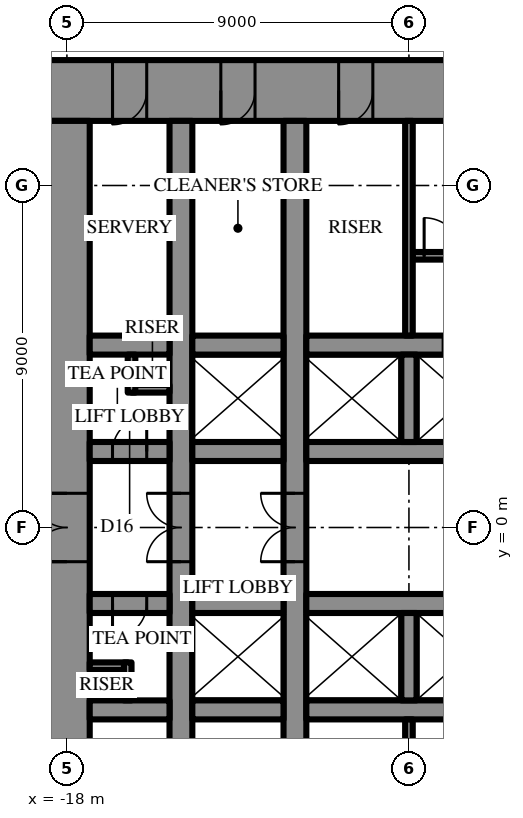
"""IFC4 building model, lengths in metres.
Left out: names, types, materials, properties, quantities, classifications, styles, units other than length and angle.
Written with IfcOpenShell. Run it as: python <this file> out.ifc"""

import sys

from ifc_helpers import new_model, si_unit, direction, frame, frame_2d, origin, place, context, subcontext, project, spatial, rectangle, extrude, element, fill, save


model = new_model("IFC4")
c1 = context("Model", 3, precision=1e-05, world=origin(), true_north=direction((0.0, 1.0)))
c2 = subcontext(c1, "Body", "Model", "MODEL_VIEW")
j1 = project(units=[si_unit("LENGTHUNIT", "METRE"), si_unit("PLANEANGLEUNIT", "RADIAN")], contexts=[c1])
p1 = place(None, origin())
s1 = spatial("IfcSite", under=j1, at=p1, CompositionType="ELEMENT")
p2 = place(p1, origin())
s2 = spatial("IfcBuilding", under=s1, at=p2, CompositionType="ELEMENT")
p3 = place(p2, frame((0.0, 0.0, 161.5)))
s3 = spatial("IfcBuildingStorey", under=s2, at=p3, CompositionType="ELEMENT", Elevation=161.5)
p4 = place(p3, frame((-18.6, 11.5, 0.0), z_axis=(0.0, 0.0, 1.0), x_axis=(1.0, 0.0, 0.0)))
e1 = element("IfcWall", 1, at=p4, inside=s3, PredefinedType="SHEAR", context=c2, shape_type="SweptSolid", body=[
    extrude(rectangle(XDim=37.2, YDim=1.6, at=frame_2d((18.6, 0.0))), origin(), (0.0, 0.0, 1.0), 4.2),
])
p5 = place(p4, frame((19.45, 0.0, 0.0)))
e2 = element("IfcOpeningElement", 2, at=p5, cuts=e1, PredefinedType="OPENING", context=c2, shape_type="SweptSolid", body=[
    extrude(rectangle(XDim=0.9, YDim=2.2, at=frame_2d((0.45, 1.1))), frame((0.0, 0.81, 0.0), z_axis=(0.0, -1.0, 0.0), x_axis=(1.0, 0.0, 0.0)), (0.0, 0.0, 1.0), 1.62),
])
p6 = place(p4, frame((22.45, 0.0, 0.0)))
e3 = element("IfcOpeningElement", 3, at=p6, cuts=e1, PredefinedType="OPENING", context=c2, shape_type="SweptSolid", body=[
    extrude(rectangle(XDim=0.9, YDim=2.2, at=frame_2d((0.45, 1.1))), frame((0.0, 0.81, 0.0), z_axis=(0.0, -1.0, 0.0), x_axis=(1.0, 0.0, 0.0)), (0.0, 0.0, 1.0), 1.62),
])
p7 = place(p4, frame((25.5, 0.0, 0.0)))
e4 = element("IfcOpeningElement", 4, at=p7, cuts=e1, PredefinedType="OPENING", context=c2, shape_type="SweptSolid", body=[
    extrude(rectangle(XDim=1.0, YDim=2.2, at=frame_2d((0.5, 1.1))), frame((0.0, 0.81, 0.0), z_axis=(0.0, -1.0, 0.0), x_axis=(1.0, 0.0, 0.0)), (0.0, 0.0, 1.0), 1.62),
])
p8 = place(p4, frame((1.8, 0.0, 0.0)))
e5 = element("IfcOpeningElement", 5, at=p8, cuts=e1, PredefinedType="OPENING", context=c2, shape_type="SweptSolid", body=[
    extrude(rectangle(XDim=0.9, YDim=2.2, at=frame_2d((0.45, 1.1))), frame((0.0, 0.81, 0.0), z_axis=(0.0, -1.0, 0.0), x_axis=(1.0, 0.0, 0.0)), (0.0, 0.0, 1.0), 1.62),
])
p9 = place(p4, frame((4.65, 0.0, 0.0)))
e6 = element("IfcOpeningElement", 6, at=p9, cuts=e1, PredefinedType="OPENING", context=c2, shape_type="SweptSolid", body=[
    extrude(rectangle(XDim=0.9, YDim=2.2, at=frame_2d((0.45, 1.1))), frame((0.0, 0.81, 0.0), z_axis=(0.0, -1.0, 0.0), x_axis=(1.0, 0.0, 0.0)), (0.0, 0.0, 1.0), 1.62),
])
p10 = place(p4, frame((7.75, 0.0, 0.0)))
e7 = element("IfcOpeningElement", 7, at=p10, cuts=e1, PredefinedType="OPENING", context=c2, shape_type="SweptSolid", body=[
    extrude(rectangle(XDim=0.9, YDim=2.2, at=frame_2d((0.45, 1.1))), frame((0.0, 0.81, 0.0), z_axis=(0.0, -1.0, 0.0), x_axis=(1.0, 0.0, 0.0)), (0.0, 0.0, 1.0), 1.62),
])
p11 = place(p4, frame((28.55, 0.0, 0.0)))
e8 = element("IfcOpeningElement", 8, at=p11, cuts=e1, PredefinedType="OPENING", context=c2, shape_type="SweptSolid", body=[
    extrude(rectangle(XDim=0.9, YDim=2.2, at=frame_2d((0.45, 1.1))), frame((0.0, 0.81, 0.0), z_axis=(0.0, -1.0, 0.0), x_axis=(1.0, 0.0, 0.0)), (0.0, 0.0, 1.0), 1.62),
])
p12 = place(p4, frame((31.65, 0.0, 0.0)))
e9 = element("IfcOpeningElement", 9, at=p12, cuts=e1, PredefinedType="OPENING", context=c2, shape_type="SweptSolid", body=[
    extrude(rectangle(XDim=0.9, YDim=2.2, at=frame_2d((0.45, 1.1))), frame((0.0, 0.81, 0.0), z_axis=(0.0, -1.0, 0.0), x_axis=(1.0, 0.0, 0.0)), (0.0, 0.0, 1.0), 1.62),
])
p13 = place(p4, frame((34.5, 0.0, 0.0)))
e10 = element("IfcOpeningElement", 10, at=p13, cuts=e1, PredefinedType="OPENING", context=c2, shape_type="SweptSolid", body=[
    extrude(rectangle(XDim=0.9, YDim=2.2, at=frame_2d((0.45, 1.1))), frame((0.0, 0.81, 0.0), z_axis=(0.0, -1.0, 0.0), x_axis=(1.0, 0.0, 0.0)), (0.0, 0.0, 1.0), 1.62),
])
p14 = place(p3, frame((-18.0, 10.7, 0.0), z_axis=(0.0, 0.0, 1.0), x_axis=(0.0, -1.0, 0.0)))
e11 = element("IfcWall", 11, at=p14, inside=s3, PredefinedType="SHEAR", context=c2, shape_type="SweptSolid", body=[
    extrude(rectangle(XDim=21.4, YDim=1.2, at=frame_2d((10.7, 0.0))), origin(), (0.0, 0.0, 1.0), 4.2),
])
p15 = place(p14, frame((9.8, 0.0, 0.0)))
e12 = element("IfcOpeningElement", 12, at=p15, cuts=e11, PredefinedType="OPENING", context=c2, shape_type="SweptSolid", body=[
    extrude(rectangle(XDim=1.8, YDim=2.4, at=frame_2d((0.9, 1.2))), frame((0.0, 0.61, 0.0), z_axis=(0.0, -1.0, 0.0), x_axis=(1.0, 0.0, 0.0)), (0.0, 0.0, 1.0), 1.22),
])
p16 = place(p3, frame((-12.0, -10.7, 0.0), z_axis=(0.0, 0.0, 1.0), x_axis=(0.0, 1.0, 0.0)))
e13 = element("IfcWall", 13, at=p16, inside=s3, PredefinedType="SHEAR", context=c2, shape_type="SweptSolid", body=[
    extrude(rectangle(XDim=21.4, YDim=0.6, at=frame_2d((10.7, 0.0))), origin(), (0.0, 0.0, 1.0), 4.2),
])
p17 = place(p16, frame((9.8, 0.0, 0.0)))
e14 = element("IfcOpeningElement", 14, at=p17, cuts=e13, PredefinedType="OPENING", context=c2, shape_type="SweptSolid", body=[
    extrude(rectangle(XDim=1.8, YDim=2.4, at=frame_2d((0.9, 1.2))), frame((0.0, 0.31, 0.0), z_axis=(0.0, -1.0, 0.0), x_axis=(1.0, 0.0, 0.0)), (0.0, 0.0, 1.0), 0.62),
])
p18 = place(p3, frame((-15.0, -10.7, 0.0), z_axis=(0.0, 0.0, 1.0), x_axis=(0.0, 1.0, 0.0)))
e15 = element("IfcWall", 15, at=p18, inside=s3, PredefinedType="SHEAR", context=c2, shape_type="SweptSolid", body=[
    extrude(rectangle(XDim=21.4, YDim=0.6, at=frame_2d((10.7, 0.0))), origin(), (0.0, 0.0, 1.0), 4.2),
])
p19 = place(p18, frame((9.8, 0.0, 0.0)))
e16 = element("IfcOpeningElement", 16, at=p19, cuts=e15, PredefinedType="OPENING", context=c2, shape_type="SweptSolid", body=[
    extrude(rectangle(XDim=1.8, YDim=2.4, at=frame_2d((0.9, 1.2))), frame((0.0, 0.31, 0.0), z_axis=(0.0, -1.0, 0.0), x_axis=(1.0, 0.0, 0.0)), (0.0, 0.0, 1.0), 0.62),
])
p20 = place(p3, frame((-17.4, 2.0, 0.0), z_axis=(0.0, 0.0, 1.0), x_axis=(1.0, 0.0, 0.0)))
e17 = element("IfcWall", 17, at=p20, inside=s3, PredefinedType="SHEAR", context=c2, shape_type="SweptSolid", body=[
    extrude(rectangle(XDim=2.1, YDim=0.5, at=frame_2d((1.05, 0.0))), origin(), (0.0, 0.0, 1.0), 4.2),
])
p21 = place(p20, frame((0.6, 0.0, 0.0)))
e18 = element("IfcOpeningElement", 18, at=p21, cuts=e17, PredefinedType="OPENING", context=c2, shape_type="SweptSolid", body=[
    extrude(rectangle(XDim=0.9, YDim=2.2, at=frame_2d((0.45, 1.1))), frame((0.0, 0.26, 0.0), z_axis=(0.0, -1.0, 0.0), x_axis=(1.0, 0.0, 0.0)), (0.0, 0.0, 1.0), 0.52),
])
p22 = place(p3, frame((-14.7, 2.0, 0.0), z_axis=(0.0, 0.0, 1.0), x_axis=(1.0, 0.0, 0.0)))
e19 = element("IfcWall", 19, at=p22, inside=s3, PredefinedType="SHEAR", context=c2, shape_type="SweptSolid", body=[
    extrude(rectangle(XDim=2.4, YDim=0.5, at=frame_2d((1.2, 0.0))), origin(), (0.0, 0.0, 1.0), 4.2),
])
p23 = place(p3, frame((-11.7, 2.0, 0.0), z_axis=(0.0, 0.0, 1.0), x_axis=(1.0, 0.0, 0.0)))
e20 = element("IfcWall", 20, at=p23, inside=s3, PredefinedType="SHEAR", context=c2, shape_type="SweptSolid", body=[
    extrude(rectangle(XDim=5.9, YDim=0.5, at=frame_2d((2.95, 0.0))), origin(), (0.0, 0.0, 1.0), 4.2),
])
p24 = place(p3, frame((-17.4, 4.8, 0.0), z_axis=(0.0, 0.0, 1.0), x_axis=(1.0, 0.0, 0.0)))
e21 = element("IfcWall", 21, at=p24, inside=s3, PredefinedType="SHEAR", context=c2, shape_type="SweptSolid", body=[
    extrude(rectangle(XDim=2.1, YDim=0.5, at=frame_2d((1.05, 0.0))), origin(), (0.0, 0.0, 1.0), 4.2),
])
p25 = place(p3, frame((-14.7, 4.8, 0.0), z_axis=(0.0, 0.0, 1.0), x_axis=(1.0, 0.0, 0.0)))
e22 = element("IfcWall", 22, at=p25, inside=s3, PredefinedType="SHEAR", context=c2, shape_type="SweptSolid", body=[
    extrude(rectangle(XDim=2.4, YDim=0.5, at=frame_2d((1.2, 0.0))), origin(), (0.0, 0.0, 1.0), 4.2),
])
p26 = place(p3, frame((-11.7, 4.8, 0.0), z_axis=(0.0, 0.0, 1.0), x_axis=(1.0, 0.0, 0.0)))
e23 = element("IfcWall", 23, at=p26, inside=s3, PredefinedType="SHEAR", context=c2, shape_type="SweptSolid", body=[
    extrude(rectangle(XDim=23.4, YDim=0.5, at=frame_2d((11.7, 0.0))), origin(), (0.0, 0.0, 1.0), 4.2),
])
p27 = place(p26, frame((6.6, 0.0, 0.0)))
e24 = element("IfcOpeningElement", 24, at=p27, cuts=e23, PredefinedType="OPENING", context=c2, shape_type="SweptSolid", body=[
    extrude(rectangle(XDim=1.2, YDim=2.2, at=frame_2d((0.6, 1.1))), frame((0.0, 0.26, 0.0), z_axis=(0.0, -1.0, 0.0), x_axis=(1.0, 0.0, 0.0)), (0.0, 0.0, 1.0), 0.52),
])
p28 = place(p26, frame((3.6, 0.0, 0.0)))
e25 = element("IfcOpeningElement", 25, at=p28, cuts=e23, PredefinedType="OPENING", context=c2, shape_type="SweptSolid", body=[
    extrude(rectangle(XDim=1.2, YDim=2.2, at=frame_2d((0.6, 1.1))), frame((0.0, 0.26, 0.0), z_axis=(0.0, -1.0, 0.0), x_axis=(1.0, 0.0, 0.0)), (0.0, 0.0, 1.0), 0.52),
])
p29 = place(p3, frame((-9.0, 2.25, 0.0), z_axis=(0.0, 0.0, 1.0), x_axis=(0.0, 1.0, 0.0)))
e26 = element("IfcWall", 26, at=p29, inside=s3, PredefinedType="SHEAR", context=c2, shape_type="SweptSolid", body=[
    extrude(rectangle(XDim=2.3, YDim=0.4, at=frame_2d((1.15, 0.0))), origin(), (0.0, 0.0, 1.0), 4.2),
])
p30 = place(p3, frame((-8.9, 7.15, 0.0), z_axis=(0.0, 0.0, 1.0), x_axis=(1.0, 0.0, 0.0)))
e27 = element("IfcWall", 27, at=p30, inside=s3, PredefinedType="SHEAR", context=c2, shape_type="SweptSolid", body=[
    extrude(rectangle(XDim=8.6, YDim=0.2, at=frame_2d((4.3, 0.0))), origin(), (0.0, 0.0, 1.0), 4.2),
])
p31 = place(p30, frame((0.3, 0.0, 0.0)))
e28 = element("IfcOpeningElement", 28, at=p31, cuts=e27, PredefinedType="OPENING", context=c2, shape_type="SweptSolid", body=[
    extrude(rectangle(XDim=1.0, YDim=2.2, at=frame_2d((0.5, 1.1))), frame((0.0, 0.11, 0.0), z_axis=(0.0, -1.0, 0.0), x_axis=(1.0, 0.0, 0.0)), (0.0, 0.0, 1.0), 0.22),
])
p32 = place(p3, frame((3.2, -2.0, 0.0), z_axis=(0.0, 0.0, 1.0), x_axis=(-1.0, 0.0, 0.0)))
e29 = element("IfcWall", 29, at=p32, inside=s3, PredefinedType="SHEAR", context=c2, shape_type="SweptSolid", body=[
    extrude(rectangle(XDim=14.9, YDim=0.5, at=frame_2d((7.45, 0.0))), origin(), (0.0, 0.0, 1.0), 4.2),
])
p33 = place(p32, frame((1.15, 0.0, 0.0)))
e30 = element("IfcOpeningElement", 30, at=p33, cuts=e29, PredefinedType="OPENING", context=c2, shape_type="SweptSolid", body=[
    extrude(rectangle(XDim=1.1, YDim=2.2, at=frame_2d((0.55, 1.1))), frame((0.0, 0.26, 0.0), z_axis=(0.0, -1.0, 0.0), x_axis=(1.0, 0.0, 0.0)), (0.0, 0.0, 1.0), 0.52),
])
p34 = place(p32, frame((4.15, 0.0, 0.0)))
e31 = element("IfcOpeningElement", 31, at=p34, cuts=e29, PredefinedType="OPENING", context=c2, shape_type="SweptSolid", body=[
    extrude(rectangle(XDim=1.1, YDim=2.2, at=frame_2d((0.55, 1.1))), frame((0.0, 0.26, 0.0), z_axis=(0.0, -1.0, 0.0), x_axis=(1.0, 0.0, 0.0)), (0.0, 0.0, 1.0), 0.52),
])
p35 = place(p32, frame((7.15, 0.0, 0.0)))
e32 = element("IfcOpeningElement", 32, at=p35, cuts=e29, PredefinedType="OPENING", context=c2, shape_type="SweptSolid", body=[
    extrude(rectangle(XDim=1.1, YDim=2.2, at=frame_2d((0.55, 1.1))), frame((0.0, 0.26, 0.0), z_axis=(0.0, -1.0, 0.0), x_axis=(1.0, 0.0, 0.0)), (0.0, 0.0, 1.0), 0.52),
])
p36 = place(p32, frame((10.15, 0.0, 0.0)))
e33 = element("IfcOpeningElement", 33, at=p36, cuts=e29, PredefinedType="OPENING", context=c2, shape_type="SweptSolid", body=[
    extrude(rectangle(XDim=1.1, YDim=2.2, at=frame_2d((0.55, 1.1))), frame((0.0, 0.26, 0.0), z_axis=(0.0, -1.0, 0.0), x_axis=(1.0, 0.0, 0.0)), (0.0, 0.0, 1.0), 0.52),
])
p37 = place(p3, frame((-12.3, -2.0, 0.0), z_axis=(0.0, 0.0, 1.0), x_axis=(-1.0, 0.0, 0.0)))
e34 = element("IfcWall", 34, at=p37, inside=s3, PredefinedType="SHEAR", context=c2, shape_type="SweptSolid", body=[
    extrude(rectangle(XDim=2.4, YDim=0.5, at=frame_2d((1.2, 0.0))), origin(), (0.0, 0.0, 1.0), 4.2),
])
p38 = place(p3, frame((-15.3, -2.0, 0.0), z_axis=(0.0, 0.0, 1.0), x_axis=(-1.0, 0.0, 0.0)))
e35 = element("IfcWall", 35, at=p38, inside=s3, PredefinedType="SHEAR", context=c2, shape_type="SweptSolid", body=[
    extrude(rectangle(XDim=2.1, YDim=0.5, at=frame_2d((1.05, 0.0))), origin(), (0.0, 0.0, 1.0), 4.2),
])
p39 = place(p38, frame((0.6, 0.0, 0.0)))
e36 = element("IfcOpeningElement", 36, at=p39, cuts=e35, PredefinedType="OPENING", context=c2, shape_type="SweptSolid", body=[
    extrude(rectangle(XDim=0.9, YDim=2.2, at=frame_2d((0.45, 1.1))), frame((0.0, 0.26, 0.0), z_axis=(0.0, -1.0, 0.0), x_axis=(1.0, 0.0, 0.0)), (0.0, 0.0, 1.0), 0.52),
])
p40 = place(p3, frame((11.7, -4.8, 0.0), z_axis=(0.0, 0.0, 1.0), x_axis=(-1.0, 0.0, 0.0)))
e37 = element("IfcWall", 37, at=p40, inside=s3, PredefinedType="SHEAR", context=c2, shape_type="SweptSolid", body=[
    extrude(rectangle(XDim=23.4, YDim=0.5, at=frame_2d((11.7, 0.0))), origin(), (0.0, 0.0, 1.0), 4.2),
])
p41 = place(p40, frame((6.6, 0.0, 0.0)))
e38 = element("IfcOpeningElement", 38, at=p41, cuts=e37, PredefinedType="OPENING", context=c2, shape_type="SweptSolid", body=[
    extrude(rectangle(XDim=1.2, YDim=2.2, at=frame_2d((0.6, 1.1))), frame((0.0, 0.26, 0.0), z_axis=(0.0, -1.0, 0.0), x_axis=(1.0, 0.0, 0.0)), (0.0, 0.0, 1.0), 0.52),
])
p42 = place(p40, frame((3.6, 0.0, 0.0)))
e39 = element("IfcOpeningElement", 39, at=p42, cuts=e37, PredefinedType="OPENING", context=c2, shape_type="SweptSolid", body=[
    extrude(rectangle(XDim=1.2, YDim=2.2, at=frame_2d((0.6, 1.1))), frame((0.0, 0.26, 0.0), z_axis=(0.0, -1.0, 0.0), x_axis=(1.0, 0.0, 0.0)), (0.0, 0.0, 1.0), 0.52),
])
p43 = place(p3, frame((-12.3, -4.8, 0.0), z_axis=(0.0, 0.0, 1.0), x_axis=(-1.0, 0.0, 0.0)))
e40 = element("IfcWall", 40, at=p43, inside=s3, PredefinedType="SHEAR", context=c2, shape_type="SweptSolid", body=[
    extrude(rectangle(XDim=2.4, YDim=0.5, at=frame_2d((1.2, 0.0))), origin(), (0.0, 0.0, 1.0), 4.2),
])
p44 = place(p3, frame((-15.3, -4.8, 0.0), z_axis=(0.0, 0.0, 1.0), x_axis=(-1.0, 0.0, 0.0)))
e41 = element("IfcWall", 41, at=p44, inside=s3, PredefinedType="SHEAR", context=c2, shape_type="SweptSolid", body=[
    extrude(rectangle(XDim=2.1, YDim=0.5, at=frame_2d((1.05, 0.0))), origin(), (0.0, 0.0, 1.0), 4.2),
])
p45 = place(p3, frame((-9.0, -2.25, 0.0), z_axis=(0.0, 0.0, 1.0), x_axis=(0.0, -1.0, 0.0)))
e42 = element("IfcWall", 42, at=p45, inside=s3, PredefinedType="SHEAR", context=c2, shape_type="SweptSolid", body=[
    extrude(rectangle(XDim=2.3, YDim=0.4, at=frame_2d((1.15, 0.0))), origin(), (0.0, 0.0, 1.0), 4.2),
])
for number, where, z_axis, x_axis in (
    (43, (-9.0, 5.05, 0.0), (0.0, 0.0, 1.0), (0.0, 1.0, 0.0)),
    (44, (-9.0, -5.05, 0.0), (0.0, 0.0, 1.0), (0.0, -1.0, 0.0)),
):
    element("IfcWall", number, at=place(p3, frame(where, z_axis=z_axis, x_axis=x_axis)), inside=s3, PredefinedType="PARTITIONING", context=c2, shape_type="SweptSolid", body=[
        extrude(rectangle(XDim=5.65, YDim=0.2, at=frame_2d((2.825, 0.0))), origin(), (0.0, 0.0, 1.0), 4.0),
    ])
for number, where, z_axis, x_axis in (
    (45, (-16.3, 3.65, 0.0), (0.0, 0.0, 1.0), (1.0, 0.0, 0.0)),
    (46, (-16.3, 3.55, 0.0), (0.0, 0.0, 1.0), (0.0, 1.0, 0.0)),
    (47, (-16.4, -3.65, 0.0), (0.0, 0.0, 1.0), (-1.0, 0.0, 0.0)),
    (48, (-16.4, -3.55, 0.0), (0.0, 0.0, 1.0), (0.0, -1.0, 0.0)),
):
    element("IfcWall", number, at=place(p3, frame(where, z_axis=z_axis, x_axis=x_axis)), inside=s3, PredefinedType="PARTITIONING", context=c2, shape_type="SweptSolid", body=[
        extrude(rectangle(XDim=1.0, YDim=0.2, at=frame_2d((0.5, 0.0))), origin(), (0.0, 0.0, 1.0), 4.0),
    ])
p46 = place(p15, frame((1.8, 0.0, 0.0), z_axis=(0.0, 0.0, 1.0), x_axis=(-1.0, 0.0, 0.0)))
e49 = element("IfcDoor", 49, at=p46, inside=s3, OperationType="DOUBLE_DOOR_SINGLE_SWING", PredefinedType="DOOR", context=c2, shape_type="SweptSolid", body=[
    extrude(rectangle(XDim=1.8, YDim=2.4, at=frame_2d((0.9, 1.2))), frame((0.0, 0.025, 0.0), z_axis=(0.0, -1.0, 0.0), x_axis=(1.0, 0.0, 0.0)), (0.0, 0.0, 1.0), 0.05),
])
fill(e12, e49)
p47 = place(p31, origin())
e50 = element("IfcDoor", 50, at=p47, inside=s3, OperationType="SINGLE_SWING_RIGHT", PredefinedType="DOOR", context=c2, shape_type="SweptSolid", body=[
    extrude(rectangle(XDim=1.0, YDim=2.2, at=frame_2d((0.5, 1.1))), frame((0.0, 0.025, 0.0), z_axis=(0.0, -1.0, 0.0), x_axis=(1.0, 0.0, 0.0)), (0.0, 0.0, 1.0), 0.05),
])
fill(e28, e50)
p48 = place(p8, frame((0.9, 0.0, 0.0), z_axis=(0.0, 0.0, 1.0), x_axis=(-1.0, 0.0, 0.0)))
e51 = element("IfcDoor", 51, at=p48, inside=s3, OperationType="SINGLE_SWING_LEFT", PredefinedType="DOOR", context=c2, shape_type="SweptSolid", body=[
    extrude(rectangle(XDim=0.9, YDim=2.2, at=frame_2d((0.45, 1.1))), frame((0.0, 0.025, 0.0), z_axis=(0.0, -1.0, 0.0), x_axis=(1.0, 0.0, 0.0)), (0.0, 0.0, 1.0), 0.05),
])
fill(e5, e51)
p49 = place(p9, frame((0.9, 0.0, 0.0), z_axis=(0.0, 0.0, 1.0), x_axis=(-1.0, 0.0, 0.0)))
e52 = element("IfcDoor", 52, at=p49, inside=s3, OperationType="SINGLE_SWING_LEFT", PredefinedType="DOOR", context=c2, shape_type="SweptSolid", body=[
    extrude(rectangle(XDim=0.9, YDim=2.2, at=frame_2d((0.45, 1.1))), frame((0.0, 0.025, 0.0), z_axis=(0.0, -1.0, 0.0), x_axis=(1.0, 0.0, 0.0)), (0.0, 0.0, 1.0), 0.05),
])
fill(e6, e52)
p50 = place(p10, frame((0.9, 0.0, 0.0), z_axis=(0.0, 0.0, 1.0), x_axis=(-1.0, 0.0, 0.0)))
e53 = element("IfcDoor", 53, at=p50, inside=s3, OperationType="SINGLE_SWING_LEFT", PredefinedType="DOOR", context=c2, shape_type="SweptSolid", body=[
    extrude(rectangle(XDim=0.9, YDim=2.2, at=frame_2d((0.45, 1.1))), frame((0.0, 0.025, 0.0), z_axis=(0.0, -1.0, 0.0), x_axis=(1.0, 0.0, 0.0)), (0.0, 0.0, 1.0), 0.05),
])
fill(e7, e53)
p51 = place(p21, origin())
e54 = element("IfcDoor", 54, at=p51, inside=s3, OperationType="SINGLE_SWING_LEFT", PredefinedType="DOOR", context=c2, shape_type="SweptSolid", body=[
    extrude(rectangle(XDim=0.9, YDim=2.2, at=frame_2d((0.45, 1.1))), frame((0.0, 0.025, 0.0), z_axis=(0.0, -1.0, 0.0), x_axis=(1.0, 0.0, 0.0)), (0.0, 0.0, 1.0), 0.05),
])
fill(e18, e54)
p52 = place(p39, origin())
e55 = element("IfcDoor", 55, at=p52, inside=s3, OperationType="SINGLE_SWING_LEFT", PredefinedType="DOOR", context=c2, shape_type="SweptSolid", body=[
    extrude(rectangle(XDim=0.9, YDim=2.2, at=frame_2d((0.45, 1.1))), frame((0.0, 0.025, 0.0), z_axis=(0.0, -1.0, 0.0), x_axis=(1.0, 0.0, 0.0)), (0.0, 0.0, 1.0), 0.05),
])
fill(e36, e55)
p53 = place(p17, origin())
e56 = element("IfcDoor", 56, at=p53, inside=s3, OperationType="DOUBLE_DOOR_SINGLE_SWING", PredefinedType="DOOR", context=c2, shape_type="SweptSolid", body=[
    extrude(rectangle(XDim=1.8, YDim=2.4, at=frame_2d((0.9, 1.2))), frame((0.0, 0.025, 0.0), z_axis=(0.0, -1.0, 0.0), x_axis=(1.0, 0.0, 0.0)), (0.0, 0.0, 1.0), 0.05),
])
fill(e14, e56)
p54 = place(p19, origin())
e57 = element("IfcDoor", 57, at=p54, inside=s3, OperationType="DOUBLE_DOOR_SINGLE_SWING", PredefinedType="DOOR", context=c2, shape_type="SweptSolid", body=[
    extrude(rectangle(XDim=1.8, YDim=2.4, at=frame_2d((0.9, 1.2))), frame((0.0, 0.025, 0.0), z_axis=(0.0, -1.0, 0.0), x_axis=(1.0, 0.0, 0.0)), (0.0, 0.0, 1.0), 0.05),
])
fill(e16, e57)
save(model, sys.argv[1])
